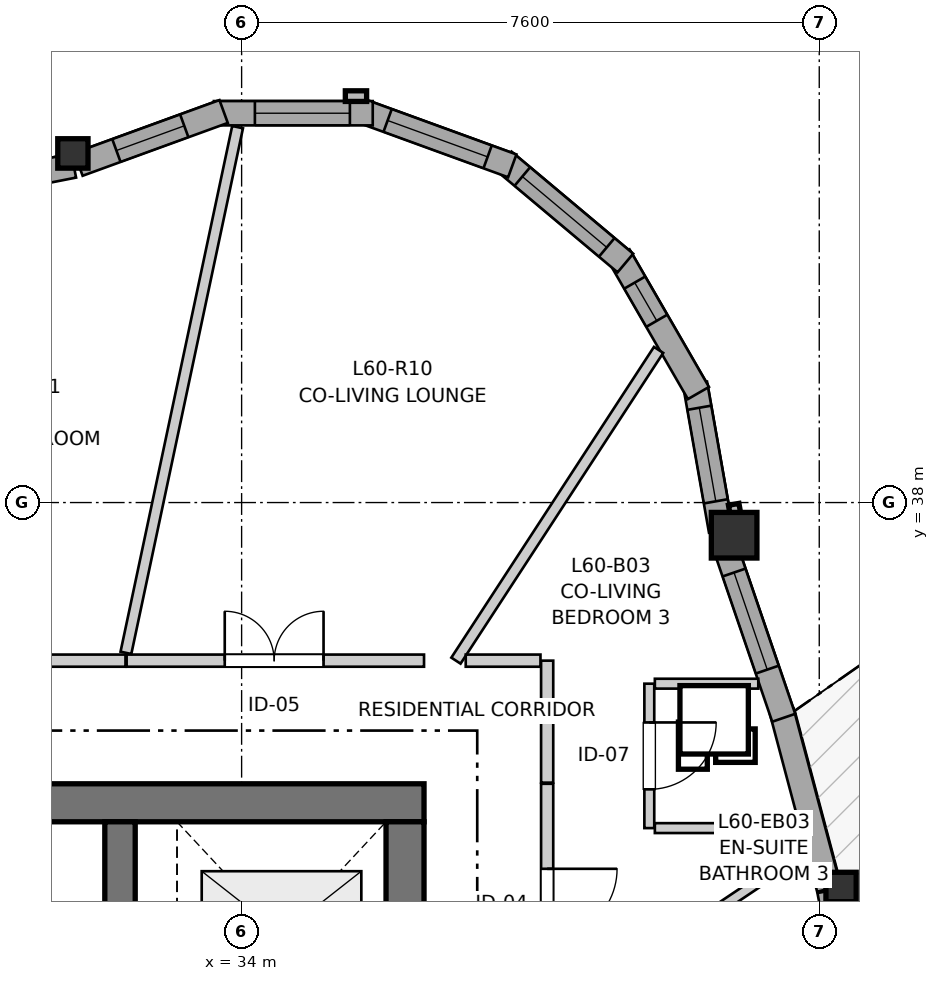
"""IFC4 building model, lengths in metres.
Left out: names, types, materials, properties, quantities, classifications, styles, units other than length and angle.
Written with IfcOpenShell. Run it as: python <this file> out.ifc"""

import sys

from ifc_helpers import new_model, si_unit, direction, frame, frame_2d, origin, origin_2d, place, context, subcontext, project, spatial, rectangle, i_section, extrude, source, transform, mapped, element, fill, save


model = new_model("IFC4")
c1 = context("Model", 3, precision=1e-05, world=origin(), true_north=direction((0.0, 1.0)))
c2 = subcontext(c1, "Body", "Model", "MODEL_VIEW")
j1 = project(units=[si_unit("LENGTHUNIT", "METRE"), si_unit("PLANEANGLEUNIT", "RADIAN")], contexts=[c1])
p1 = place(None, origin())
s1 = spatial("IfcSite", under=j1, at=p1, CompositionType="ELEMENT")
p2 = place(p1, origin())
s2 = spatial("IfcBuilding", under=s1, at=p2, CompositionType="ELEMENT")
p3 = place(p2, frame((0.0, 0.0, 202.0)))
s3 = spatial("IfcBuildingStorey", under=s2, at=p3, CompositionType="ELEMENT", Elevation=202.0)
p4 = place(p3, frame((36.4, 34.05, 0.0), z_axis=(0.0, 0.0, 1.0), x_axis=(-1.0, 0.0, 0.0)))
e1 = element("IfcWall", 1, at=p4, inside=s3, PredefinedType="SHEAR", context=c2, shape_type="SweptSolid", body=[
    extrude(rectangle(XDim=12.1, YDim=0.5, at=frame_2d((6.05, 0.0))), origin(), (0.0, 0.0, 1.0), 2.935),
])
p5 = place(p3, frame((36.15, 18.2, 0.0), z_axis=(0.0, 0.0, 1.0), x_axis=(0.0, 1.0, 0.0)))
e2 = element("IfcWall", 2, at=p5, inside=s3, PredefinedType="SHEAR", context=c2, shape_type="SweptSolid", body=[
    extrude(rectangle(XDim=15.6, YDim=0.5, at=frame_2d((7.8, 0.0))), origin(), (0.0, 0.0, 1.0), 2.935),
])
p6 = place(p5, frame((4.25, 0.0, 0.0)))
e3 = element("IfcOpeningElement", 3, at=p6, cuts=e2, PredefinedType="OPENING", context=c2, shape_type="SweptSolid", body=[
    extrude(rectangle(XDim=1.1, YDim=2.15, at=frame_2d((0.55, 1.075))), frame((0.0, 0.26, 0.0), z_axis=(0.0, -1.0, 0.0), x_axis=(1.0, 0.0, 0.0)), (0.0, 0.0, 1.0), 0.52),
])
p7 = place(p5, frame((10.25, 0.0, 0.0)))
e4 = element("IfcOpeningElement", 4, at=p7, cuts=e2, PredefinedType="OPENING", context=c2, shape_type="SweptSolid", body=[
    extrude(rectangle(XDim=1.1, YDim=2.15, at=frame_2d((0.55, 1.075))), frame((0.0, 0.26, 0.0), z_axis=(0.0, -1.0, 0.0), x_axis=(1.0, 0.0, 0.0)), (0.0, 0.0, 1.0), 0.52),
])
p8 = place(p3, frame((32.4, 30.85, 0.0), z_axis=(0.0, 0.0, 1.0), x_axis=(0.0, 1.0, 0.0)))
e5 = element("IfcWall", 5, at=p8, inside=s3, PredefinedType="SHEAR", context=c2, shape_type="SweptSolid", body=[
    extrude(rectangle(XDim=2.95, YDim=0.4, at=frame_2d((1.475, 0.0))), origin(), (0.0, 0.0, 1.0), 2.935),
])
m1 = source(origin(), c2, "Body", "SweptSolid", [
    extrude(i_section(OverallWidth=0.398, OverallDepth=0.387, WebThickness=0.019, FlangeThickness=0.03, FilletRadius=0.015, at=origin_2d()), origin(), (0.0, 0.0, 1.0), 2.935),
])
p9 = place(p3, frame((41.887, 32.942, 0.0), z_axis=(0.0, 0.0, 1.0), x_axis=(1.0, 0.0, 0.0)))
e6 = element("IfcColumn", 6, at=p9, inside=s3, PredefinedType="PILASTER", context=c2, shape_type="MappedRepresentation", body=[
    mapped(m1, transform((0.0, 0.0, 0.0), x_axis=(1.0, 0.0, 0.0), y_axis=(0.0, 1.0, 0.0), z_axis=(0.0, 0.0, 1.0), scale=1.0)),
])
m2 = source(origin(), c2, "Body", "SweptSolid", [
    extrude(rectangle(XDim=0.6, YDim=0.6, at=origin_2d()), origin(), (0.0, 0.0, 1.0), 2.935),
])
p10 = place(p3, frame((40.48, 37.57, 0.0), z_axis=(0.0, 0.0, 1.0), x_axis=(1.0, 0.0, 0.0)))
e7 = element("IfcColumn", 7, at=p10, inside=s3, PredefinedType="COLUMN", context=c2, shape_type="MappedRepresentation", body=[
    mapped(m2, transform((0.0, 0.0, 0.0), x_axis=(1.0, 0.0, 0.0), y_axis=(0.0, 1.0, 0.0), z_axis=(0.0, 0.0, 1.0), scale=1.0)),
])
p11 = place(p3, frame((31.78, 42.593, 0.0), z_axis=(0.0, 0.0, 1.0), x_axis=(1.0, 0.0, 0.0)))
e8 = element("IfcColumn", 8, at=p11, inside=s3, PredefinedType="PILASTER", context=c2, shape_type="MappedRepresentation", body=[
    mapped(m1, transform((0.0, 0.0, 0.0), x_axis=(1.0, 0.0, 0.0), y_axis=(0.0, 1.0, 0.0), z_axis=(0.0, 0.0, 1.0), scale=1.0)),
])
p12 = place(p3, frame((42.177, 30.561, 0.0), z_axis=(0.0, 0.0, 1.0), x_axis=(-0.186691421418, 0.982418603839, 0.0)))
e9 = element("IfcWall", 9, at=p12, inside=s3, PredefinedType="SOLIDWALL", context=c2, shape_type="SweptSolid", body=[
    extrude(rectangle(XDim=2.374, YDim=0.32, at=frame_2d((1.187, 0.0))), origin(), (0.0, 0.0, 1.0), 2.555),
])
p13 = place(p12, frame((0.522, 0.0, 0.82)))
e10 = element("IfcOpeningElement", 10, at=p13, cuts=e9, PredefinedType="OPENING", context=c2, shape_type="SweptSolid", body=[
    extrude(rectangle(XDim=1.35, YDim=1.45, at=frame_2d((0.675, 0.725))), frame((0.0, 0.17, 0.0), z_axis=(0.0, -1.0, 0.0), x_axis=(1.0, 0.0, 0.0)), (0.0, 0.0, 1.0), 0.34),
])
p14 = place(p3, frame((41.727, 32.92, 0.0), z_axis=(0.0, 0.0, 1.0), x_axis=(-0.257057896323, 0.96639600472, 0.0)))
e11 = element("IfcWall", 11, at=p14, inside=s3, PredefinedType="SOLIDWALL", context=c2, shape_type="SweptSolid", body=[
    extrude(rectangle(XDim=2.412, YDim=0.32, at=frame_2d((1.206, 0.0))), origin(), (0.0, 0.0, 1.0), 2.555),
])
p15 = place(p3, frame((41.132, 35.168, 0.0), z_axis=(0.0, 0.0, 1.0), x_axis=(-0.323654036362, 0.94617549363, 0.0)))
e12 = element("IfcWall", 12, at=p15, inside=s3, PredefinedType="SOLIDWALL", context=c2, shape_type="SweptSolid", body=[
    extrude(rectangle(XDim=2.394, YDim=0.32, at=frame_2d((1.197, 0.0))), origin(), (0.0, 0.0, 1.0), 2.555),
])
p16 = place(p15, frame((0.67, 0.0, 0.82)))
e13 = element("IfcOpeningElement", 13, at=p16, cuts=e12, PredefinedType="OPENING", context=c2, shape_type="SweptSolid", body=[
    extrude(rectangle(XDim=1.35, YDim=1.45, at=frame_2d((0.675, 0.725))), frame((0.0, 0.17, 0.0), z_axis=(0.0, -1.0, 0.0), x_axis=(1.0, 0.0, 0.0)), (0.0, 0.0, 1.0), 0.34),
])
p17 = place(p3, frame((40.307, 37.631, 0.0), z_axis=(0.0, 0.0, 1.0), x_axis=(-0.173671780312, 0.984803590937, 0.0)))
e14 = element("IfcWall", 14, at=p17, inside=s3, PredefinedType="SOLIDWALL", context=c2, shape_type="SweptSolid", body=[
    extrude(rectangle(XDim=1.962, YDim=0.32, at=frame_2d((0.981, 0.0))), origin(), (0.0, 0.0, 1.0), 2.555),
])
p18 = place(p17, frame((0.391, 0.0, 0.82)))
e15 = element("IfcOpeningElement", 15, at=p18, cuts=e14, PredefinedType="OPENING", context=c2, shape_type="SweptSolid", body=[
    extrude(rectangle(XDim=1.25, YDim=1.35, at=frame_2d((0.625, 0.675))), frame((0.0, 0.17, 0.0), z_axis=(0.0, -1.0, 0.0), x_axis=(1.0, 0.0, 0.0)), (0.0, 0.0, 1.0), 0.34),
])
p19 = place(p3, frame((40.01, 39.441, 0.0), z_axis=(0.0, 0.0, 1.0), x_axis=(-0.49990781971, 0.866078617559, 0.0)))
e16 = element("IfcWall", 16, at=p19, inside=s3, PredefinedType="SOLIDWALL", context=c2, shape_type="SweptSolid", body=[
    extrude(rectangle(XDim=2.09, YDim=0.32, at=frame_2d((1.045, 0.0))), origin(), (0.0, 0.0, 1.0), 2.555),
])
p20 = place(p19, frame((1.097, 0.0, 0.82)))
e17 = element("IfcOpeningElement", 17, at=p20, cuts=e16, PredefinedType="OPENING", context=c2, shape_type="SweptSolid", body=[
    extrude(rectangle(XDim=0.58, YDim=1.35, at=frame_2d((0.29, 0.675))), frame((0.0, 0.17, 0.0), z_axis=(0.0, -1.0, 0.0), x_axis=(1.0, 0.0, 0.0)), (0.0, 0.0, 1.0), 0.34),
])
p21 = place(p3, frame((39.049, 41.151, 0.0), z_axis=(0.0, 0.0, 1.0), x_axis=(-0.766082082368, 0.642742750308, 0.0)))
e18 = element("IfcWall", 18, at=p21, inside=s3, PredefinedType="SOLIDWALL", context=c2, shape_type="SweptSolid", body=[
    extrude(rectangle(XDim=2.09, YDim=0.32, at=frame_2d((1.045, 0.0))), origin(), (0.0, 0.0, 1.0), 2.555),
])
p22 = place(p21, frame((0.32, 0.0, 0.82)))
e19 = element("IfcOpeningElement", 19, at=p22, cuts=e18, PredefinedType="OPENING", context=c2, shape_type="SweptSolid", body=[
    extrude(rectangle(XDim=1.45, YDim=1.25, at=frame_2d((0.725, 0.625))), frame((0.0, 0.17, 0.0), z_axis=(0.0, -1.0, 0.0), x_axis=(1.0, 0.0, 0.0)), (0.0, 0.0, 1.0), 0.34),
])
p23 = place(p3, frame((37.561, 42.43, 0.0), z_axis=(0.0, 0.0, 1.0), x_axis=(-0.939711556618, 0.341968113072, 0.0)))
e20 = element("IfcWall", 20, at=p23, inside=s3, PredefinedType="SOLIDWALL", context=c2, shape_type="SweptSolid", body=[
    extrude(rectangle(XDim=2.09, YDim=0.32, at=frame_2d((1.045, 0.0))), origin(), (0.0, 0.0, 1.0), 2.555),
])
p24 = place(p23, frame((0.345, 0.0, 0.82)))
e21 = element("IfcOpeningElement", 21, at=p24, cuts=e20, PredefinedType="OPENING", context=c2, shape_type="SweptSolid", body=[
    extrude(rectangle(XDim=1.4, YDim=1.35, at=frame_2d((0.7, 0.675))), frame((0.0, 0.17, 0.0), z_axis=(0.0, -1.0, 0.0), x_axis=(1.0, 0.0, 0.0)), (0.0, 0.0, 1.0), 0.34),
])
p25 = place(p3, frame((35.725, 43.122, 0.0), z_axis=(0.0, 0.0, 1.0), x_axis=(-1.0, 0.0, 0.0)))
e22 = element("IfcWall", 22, at=p25, inside=s3, PredefinedType="SOLIDWALL", context=c2, shape_type="SweptSolid", body=[
    extrude(rectangle(XDim=2.09, YDim=0.32, at=frame_2d((1.045, 0.0))), origin(), (0.0, 0.0, 1.0), 2.555),
])
p26 = place(p25, frame((0.301, 0.0, 0.82)))
e23 = element("IfcOpeningElement", 23, at=p26, cuts=e22, PredefinedType="OPENING", context=c2, shape_type="SweptSolid", body=[
    extrude(rectangle(XDim=1.25, YDim=1.35, at=frame_2d((0.625, 0.675))), frame((0.0, 0.17, 0.0), z_axis=(0.0, -1.0, 0.0), x_axis=(1.0, 0.0, 0.0)), (0.0, 0.0, 1.0), 0.34),
])
p27 = place(p3, frame((33.763, 43.145, 0.0), z_axis=(0.0, 0.0, 1.0), x_axis=(-0.939691662178, -0.342022777067, 0.0)))
e24 = element("IfcWall", 24, at=p27, inside=s3, PredefinedType="SOLIDWALL", context=c2, shape_type="SweptSolid", body=[
    extrude(rectangle(XDim=2.032, YDim=0.32, at=frame_2d((1.016, 0.0))), origin(), (0.0, 0.0, 1.0), 2.555),
])
p28 = place(p27, frame((0.551, 0.0, 0.82)))
e25 = element("IfcOpeningElement", 25, at=p28, cuts=e24, PredefinedType="OPENING", context=c2, shape_type="SweptSolid", body=[
    extrude(rectangle(XDim=0.95, YDim=1.35, at=frame_2d((0.475, 0.675))), frame((0.0, 0.17, 0.0), z_axis=(0.0, -1.0, 0.0), x_axis=(1.0, 0.0, 0.0)), (0.0, 0.0, 1.0), 0.34),
])
p29 = place(p3, frame((31.791, 42.432, 0.0), z_axis=(0.0, 0.0, 1.0), x_axis=(-0.981230743763, -0.192837308358, 0.0)))
e26 = element("IfcWall", 26, at=p29, inside=s3, PredefinedType="SOLIDWALL", context=c2, shape_type="SweptSolid", body=[
    extrude(rectangle(XDim=2.464, YDim=0.32, at=frame_2d((1.232, 0.0))), origin(), (0.0, 0.0, 1.0), 2.555),
])
p30 = place(p29, frame((0.497, 0.0, 0.82)))
e27 = element("IfcOpeningElement", 27, at=p30, cuts=e26, PredefinedType="OPENING", context=c2, shape_type="SweptSolid", body=[
    extrude(rectangle(XDim=1.45, YDim=1.25, at=frame_2d((0.725, 0.625))), frame((0.0, 0.17, 0.0), z_axis=(0.0, -1.0, 0.0), x_axis=(1.0, 0.0, 0.0)), (0.0, 0.0, 1.0), 0.34),
])
p31 = place(p3, frame((27.156, 35.92, 0.0), z_axis=(0.0, 0.0, 1.0), x_axis=(1.0, 0.0, 0.0)))
e28 = element("IfcWall", 28, at=p31, inside=s3, PredefinedType="PARTITIONING", context=c2, shape_type="SweptSolid", body=[
    extrude(rectangle(XDim=5.316, YDim=0.16, at=frame_2d((2.658, 0.0))), origin(), (0.0, 0.0, 1.0), 2.603),
])
p32 = place(p31, frame((2.178, 0.0, 0.0)))
e29 = element("IfcOpeningElement", 29, at=p32, cuts=e28, PredefinedType="OPENING", context=c2, shape_type="SweptSolid", body=[
    extrude(rectangle(XDim=0.96, YDim=2.1, at=frame_2d((0.48, 1.05))), frame((0.0, 0.09, 0.0), z_axis=(0.0, -1.0, 0.0), x_axis=(1.0, 0.0, 0.0)), (0.0, 0.0, 1.0), 0.18),
])
p33 = place(p3, frame((32.487, 35.92, 0.0), z_axis=(0.0, 0.0, 1.0), x_axis=(1.0, 0.0, 0.0)))
e30 = element("IfcWall", 30, at=p33, inside=s3, PredefinedType="PARTITIONING", context=c2, shape_type="SweptSolid", body=[
    extrude(rectangle(XDim=3.913, YDim=0.16, at=frame_2d((1.957, 0.0))), origin(), (0.0, 0.0, 1.0), 2.935),
])
p34 = place(p33, frame((1.291, 0.0, 0.0)))
e31 = element("IfcOpeningElement", 31, at=p34, cuts=e30, PredefinedType="OPENING", context=c2, shape_type="SweptSolid", body=[
    extrude(rectangle(XDim=1.3, YDim=2.1, at=frame_2d((0.65, 1.05))), frame((0.0, 0.09, 0.0), z_axis=(0.0, -1.0, 0.0), x_axis=(1.0, 0.0, 0.0)), (0.0, 0.0, 1.0), 0.18),
])
p35 = place(p3, frame((38.02, 34.3, 0.0), z_axis=(0.0, 0.0, 1.0), x_axis=(0.0, -1.0, 0.0)))
e32 = element("IfcWall", 32, at=p35, inside=s3, PredefinedType="PARTITIONING", context=c2, shape_type="SweptSolid", body=[
    extrude(rectangle(XDim=3.124, YDim=0.16, at=frame_2d((1.562, 0.0))), origin(), (0.0, 0.0, 1.0), 2.603),
])
p36 = place(p35, frame((1.118, 0.0, 0.0)))
e33 = element("IfcOpeningElement", 33, at=p36, cuts=e32, PredefinedType="OPENING", context=c2, shape_type="SweptSolid", body=[
    extrude(rectangle(XDim=0.92, YDim=2.1, at=frame_2d((0.46, 1.05))), frame((0.0, 0.09, 0.0), z_axis=(0.0, -1.0, 0.0), x_axis=(1.0, 0.0, 0.0)), (0.0, 0.0, 1.0), 0.18),
])
p37 = place(p3, frame((39.364, 35.617, 0.0), z_axis=(0.0, 0.0, 1.0), x_axis=(0.0, -1.0, 0.0)))
e34 = element("IfcWall", 34, at=p37, inside=s3, PredefinedType="PARTITIONING", context=c2, shape_type="SweptSolid", body=[
    extrude(rectangle(XDim=1.9, YDim=0.13, at=frame_2d((0.95, 0.0))), origin(), (0.0, 0.0, 1.0), 2.573),
])
p38 = place(p37, frame((0.51, 0.0, 0.0)))
e35 = element("IfcOpeningElement", 35, at=p38, cuts=e34, PredefinedType="OPENING", context=c2, shape_type="SweptSolid", body=[
    extrude(rectangle(XDim=0.88, YDim=2.05, at=frame_2d((0.44, 1.025))), frame((0.0, 0.075, 0.0), z_axis=(0.0, -1.0, 0.0), x_axis=(1.0, 0.0, 0.0)), (0.0, 0.0, 1.0), 0.15),
])
p39 = place(p3, frame((32.478, 36.023, 0.0), z_axis=(0.0, 0.0, 1.0), x_axis=(0.207795571792, 0.978172275391, 0.0)))
e36 = element("IfcWall", 36, at=p39, inside=s3, PredefinedType="PARTITIONING", context=c2, shape_type="SweptSolid", body=[
    extrude(rectangle(XDim=7.071, YDim=0.145, at=frame_2d((3.535, 0.0))), origin(), (0.0, 0.0, 1.0), 2.935),
])
p40 = place(p3, frame((36.82, 35.92, 0.0), z_axis=(0.0, 0.0, 1.0), x_axis=(0.546222005159, 0.83764044857, 0.0)))
e37 = element("IfcWall", 37, at=p40, inside=s3, PredefinedType="PARTITIONING", context=c2, shape_type="SweptSolid", body=[
    extrude(rectangle(XDim=4.881, YDim=0.145, at=frame_2d((2.44, 0.0))), origin(), (0.0, 0.0, 1.0), 2.935),
])
p41 = place(p3, frame((38.143, 31.225, 0.0), z_axis=(0.0, 0.0, 1.0), x_axis=(0.830560844451, 0.556927898084, 0.0)))
e38 = element("IfcWall", 38, at=p41, inside=s3, PredefinedType="PARTITIONING", context=c2, shape_type="SweptSolid", body=[
    extrude(rectangle(XDim=3.942, YDim=0.13, at=frame_2d((1.971, 0.0))), origin(), (0.0, 0.0, 1.0), 2.935),
])
p42 = place(p3, frame((39.437, 33.717, 0.0), z_axis=(0.0, 0.0, 1.0), x_axis=(1.0, 0.0, 0.0)))
e39 = element("IfcWall", 39, at=p42, inside=s3, PredefinedType="PARTITIONING", context=c2, shape_type="SweptSolid", body=[
    extrude(rectangle(XDim=1.727, YDim=0.13, at=frame_2d((0.864, 0.0))), origin(), (0.0, 0.0, 1.0), 2.935),
])
p43 = place(p3, frame((38.02, 34.315, 0.0), z_axis=(0.0, 0.0, 1.0), x_axis=(0.0, 1.0, 0.0)))
e40 = element("IfcWall", 40, at=p43, inside=s3, PredefinedType="PARTITIONING", context=c2, shape_type="SweptSolid", body=[
    extrude(rectangle(XDim=1.605, YDim=0.16, at=frame_2d((0.802, 0.0))), origin(), (0.0, 0.0, 1.0), 2.603),
])
p44 = place(p3, frame((39.437, 35.617, 0.0), z_axis=(0.0, 0.0, 1.0), x_axis=(1.0, 0.0, 0.0)))
e41 = element("IfcWall", 41, at=p44, inside=s3, PredefinedType="PARTITIONING", context=c2, shape_type="SweptSolid", body=[
    extrude(rectangle(XDim=1.361, YDim=0.13, at=frame_2d((0.68, 0.0))), origin(), (0.0, 0.0, 1.0), 2.935),
])
p45 = place(p3, frame((36.949, 35.92, 0.0), z_axis=(0.0, 0.0, 1.0), x_axis=(1.0, 0.0, 0.0)))
e42 = element("IfcWall", 42, at=p45, inside=s3, PredefinedType="PARTITIONING", context=c2, shape_type="SweptSolid", body=[
    extrude(rectangle(XDim=0.983, YDim=0.16, at=frame_2d((0.492, 0.0))), origin(), (0.0, 0.0, 1.0), 2.935),
])
m3 = source(origin(), c2, "Body", "SweptSolid", [
    extrude(rectangle(XDim=1.35, YDim=1.45, at=frame_2d((0.675, 0.725))), frame((0.0, 0.03, 0.0), z_axis=(0.0, -1.0, 0.0), x_axis=(1.0, 0.0, 0.0)), (0.0, 0.0, 1.0), 0.06),
])
p46 = place(p16, origin())
e43 = element("IfcWindow", 43, at=p46, inside=s3, PartitioningType="SINGLE_PANEL", PredefinedType="WINDOW", context=c2, shape_type="MappedRepresentation", body=[
    mapped(m3, transform((0.0, 0.0, 0.0), x_axis=(1.0, 0.0, 0.0), y_axis=(0.0, 1.0, 0.0), z_axis=(0.0, 0.0, 1.0), scale=1.0)),
])
fill(e13, e43)
m4 = source(origin(), c2, "Body", "SweptSolid", [
    extrude(rectangle(XDim=1.25, YDim=1.35, at=frame_2d((0.625, 0.675))), frame((0.0, 0.03, 0.0), z_axis=(0.0, -1.0, 0.0), x_axis=(1.0, 0.0, 0.0)), (0.0, 0.0, 1.0), 0.06),
])
p47 = place(p18, origin())
e44 = element("IfcWindow", 44, at=p47, inside=s3, PartitioningType="SINGLE_PANEL", PredefinedType="WINDOW", context=c2, shape_type="MappedRepresentation", body=[
    mapped(m4, transform((0.0, 0.0, 0.0), x_axis=(1.0, 0.0, 0.0), y_axis=(0.0, 1.0, 0.0), z_axis=(0.0, 0.0, 1.0), scale=1.0)),
])
fill(e15, e44)
m5 = source(origin(), c2, "Body", "SweptSolid", [
    extrude(rectangle(XDim=0.58, YDim=1.35, at=frame_2d((0.29, 0.675))), frame((0.0, 0.03, 0.0), z_axis=(0.0, -1.0, 0.0), x_axis=(1.0, 0.0, 0.0)), (0.0, 0.0, 1.0), 0.06),
])
p48 = place(p20, origin())
e45 = element("IfcWindow", 45, at=p48, inside=s3, PartitioningType="SINGLE_PANEL", PredefinedType="WINDOW", context=c2, shape_type="MappedRepresentation", body=[
    mapped(m5, transform((0.0, 0.0, 0.0), x_axis=(1.0, 0.0, 0.0), y_axis=(0.0, 1.0, 0.0), z_axis=(0.0, 0.0, 1.0), scale=1.0)),
])
fill(e17, e45)
m6 = source(origin(), c2, "Body", "SweptSolid", [
    extrude(rectangle(XDim=1.45, YDim=1.25, at=frame_2d((0.725, 0.625))), frame((0.0, 0.03, 0.0), z_axis=(0.0, -1.0, 0.0), x_axis=(1.0, 0.0, 0.0)), (0.0, 0.0, 1.0), 0.06),
])
p49 = place(p22, origin())
e46 = element("IfcWindow", 46, at=p49, inside=s3, PartitioningType="SINGLE_PANEL", PredefinedType="WINDOW", context=c2, shape_type="MappedRepresentation", body=[
    mapped(m6, transform((0.0, 0.0, 0.0), x_axis=(1.0, 0.0, 0.0), y_axis=(0.0, 1.0, 0.0), z_axis=(0.0, 0.0, 1.0), scale=1.0)),
])
fill(e19, e46)
m7 = source(origin(), c2, "Body", "SweptSolid", [
    extrude(rectangle(XDim=1.4, YDim=1.35, at=frame_2d((0.7, 0.675))), frame((0.0, 0.03, 0.0), z_axis=(0.0, -1.0, 0.0), x_axis=(1.0, 0.0, 0.0)), (0.0, 0.0, 1.0), 0.06),
])
p50 = place(p24, origin())
e47 = element("IfcWindow", 47, at=p50, inside=s3, PartitioningType="SINGLE_PANEL", PredefinedType="WINDOW", context=c2, shape_type="MappedRepresentation", body=[
    mapped(m7, transform((0.0, 0.0, 0.0), x_axis=(1.0, 0.0, 0.0), y_axis=(0.0, 1.0, 0.0), z_axis=(0.0, 0.0, 1.0), scale=1.0)),
])
fill(e21, e47)
p51 = place(p26, origin())
e48 = element("IfcWindow", 48, at=p51, inside=s3, PartitioningType="SINGLE_PANEL", PredefinedType="WINDOW", context=c2, shape_type="MappedRepresentation", body=[
    mapped(m4, transform((0.0, 0.0, 0.0), x_axis=(1.0, 0.0, 0.0), y_axis=(0.0, 1.0, 0.0), z_axis=(0.0, 0.0, 1.0), scale=1.0)),
])
fill(e23, e48)
m8 = source(origin(), c2, "Body", "SweptSolid", [
    extrude(rectangle(XDim=0.95, YDim=1.35, at=frame_2d((0.475, 0.675))), frame((0.0, 0.03, 0.0), z_axis=(0.0, -1.0, 0.0), x_axis=(1.0, 0.0, 0.0)), (0.0, 0.0, 1.0), 0.06),
])
p52 = place(p28, origin())
e49 = element("IfcWindow", 49, at=p52, inside=s3, PartitioningType="SINGLE_PANEL", PredefinedType="WINDOW", context=c2, shape_type="MappedRepresentation", body=[
    mapped(m8, transform((0.0, 0.0, 0.0), x_axis=(1.0, 0.0, 0.0), y_axis=(0.0, 1.0, 0.0), z_axis=(0.0, 0.0, 1.0), scale=1.0)),
])
fill(e25, e49)
m9 = source(origin(), c2, "Body", "SweptSolid", [
    extrude(rectangle(XDim=1.3, YDim=2.1, at=frame_2d((0.65, 1.05))), frame((0.0, 0.025, 0.0), z_axis=(0.0, -1.0, 0.0), x_axis=(1.0, 0.0, 0.0)), (0.0, 0.0, 1.0), 0.05),
])
p53 = place(p34, origin())
e50 = element("IfcDoor", 50, at=p53, inside=s3, OperationType="DOUBLE_DOOR_SINGLE_SWING", PredefinedType="DOOR", context=c2, shape_type="MappedRepresentation", body=[
    mapped(m9, transform((0.0, 0.0, 0.0), x_axis=(1.0, 0.0, 0.0), y_axis=(0.0, 1.0, 0.0), z_axis=(0.0, 0.0, 1.0), scale=1.0)),
])
fill(e31, e50)
m10 = source(origin(), c2, "Body", "SweptSolid", [
    extrude(rectangle(XDim=0.92, YDim=2.1, at=frame_2d((0.46, 1.05))), frame((0.0, 0.025, 0.0), z_axis=(0.0, -1.0, 0.0), x_axis=(1.0, 0.0, 0.0)), (0.0, 0.0, 1.0), 0.05),
])
p54 = place(p36, origin())
e51 = element("IfcDoor", 51, at=p54, inside=s3, OperationType="SINGLE_SWING_LEFT", PredefinedType="DOOR", context=c2, shape_type="MappedRepresentation", body=[
    mapped(m10, transform((0.0, 0.0, 0.0), x_axis=(1.0, 0.0, 0.0), y_axis=(0.0, 1.0, 0.0), z_axis=(0.0, 0.0, 1.0), scale=1.0)),
])
fill(e33, e51)
m11 = source(origin(), c2, "Body", "SweptSolid", [
    extrude(rectangle(XDim=0.88, YDim=2.05, at=frame_2d((0.44, 1.025))), frame((0.0, 0.025, 0.0), z_axis=(0.0, -1.0, 0.0), x_axis=(1.0, 0.0, 0.0)), (0.0, 0.0, 1.0), 0.05),
])
p55 = place(p38, origin())
e52 = element("IfcDoor", 52, at=p55, inside=s3, OperationType="SINGLE_SWING_LEFT", PredefinedType="DOOR", context=c2, shape_type="MappedRepresentation", body=[
    mapped(m11, transform((0.0, 0.0, 0.0), x_axis=(1.0, 0.0, 0.0), y_axis=(0.0, 1.0, 0.0), z_axis=(0.0, 0.0, 1.0), scale=1.0)),
])
fill(e35, e52)
save(model, sys.argv[1])
